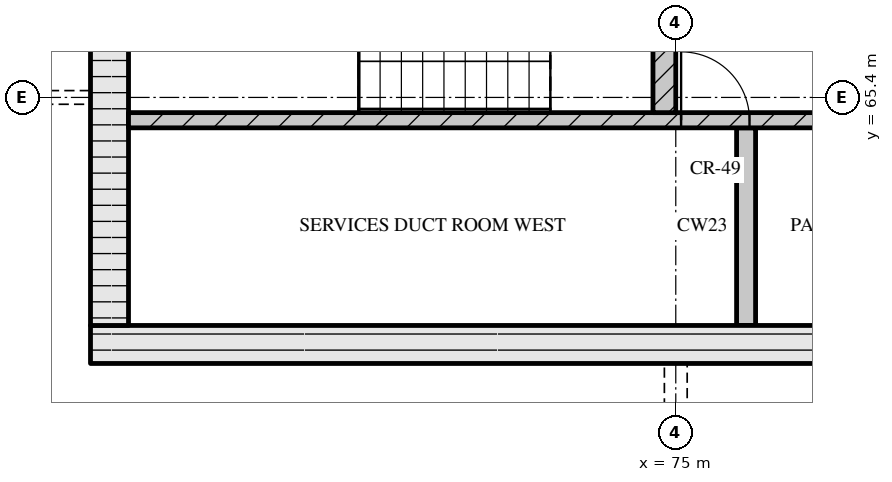
"""IFC4 building model, lengths in metres.
Left out: names, types, materials, properties, quantities, classifications, styles, units other than length and angle.
Written with IfcOpenShell. Run it as: python <this file> out.ifc"""

import sys

from ifc_helpers import new_model, si_unit, direction, frame, frame_2d, origin, place, context, subcontext, project, spatial, rectangle, extrude, element, fill, save


model = new_model("IFC4")
c1 = context("Model", 3, precision=1e-05, world=origin(), true_north=direction((0.0, 1.0)))
c2 = subcontext(c1, "Body", "Model", "MODEL_VIEW")
j1 = project(units=[si_unit("LENGTHUNIT", "METRE"), si_unit("PLANEANGLEUNIT", "RADIAN")], contexts=[c1])
p1 = place(None, origin())
s1 = spatial("IfcSite", under=j1, at=p1, CompositionType="ELEMENT")
p2 = place(p1, origin())
s2 = spatial("IfcBuilding", under=s1, at=p2, CompositionType="ELEMENT")
p3 = place(p2, frame((0.0, 0.0, 281.55)))
s3 = spatial("IfcBuildingStorey", under=s2, at=p3, CompositionType="ELEMENT", Elevation=281.55)
p4 = place(p3, frame((67.3, 62.15, 0.0), z_axis=(0.0, 0.0, 1.0), x_axis=(1.0, 0.0, 0.0)))
e1 = element("IfcWall", 1, at=p4, inside=s3, PredefinedType="SOLIDWALL", context=c2, shape_type="SweptSolid", body=[
    extrude(rectangle(XDim=40.6, YDim=0.5, at=frame_2d((20.3, 0.0))), origin(), (0.0, 0.0, 1.0), 3.32),
])
p5 = place(p4, frame((20.65, 0.0, 0.0)))
e2 = element("IfcOpeningElement", 2, at=p5, cuts=e1, PredefinedType="OPENING", context=c2, shape_type="SweptSolid", body=[
    extrude(rectangle(XDim=1.8, YDim=2.1, at=frame_2d((0.9, 1.05))), frame((0.0, 0.26, 0.0), z_axis=(0.0, -1.0, 0.0), x_axis=(1.0, 0.0, 0.0)), (0.0, 0.0, 1.0), 0.52),
])
p6 = place(p3, frame((67.55, 62.4, 0.0), z_axis=(0.0, 0.0, 1.0), x_axis=(0.0, 1.0, 0.0)))
e3 = element("IfcWall", 3, at=p6, inside=s3, PredefinedType="SOLIDWALL", context=c2, shape_type="SweptSolid", body=[
    extrude(rectangle(XDim=12.0, YDim=0.5, at=frame_2d((6.0, 0.0))), origin(), (0.0, 0.0, 1.0), 3.32),
])
p7 = place(p6, frame((6.45, 0.0, 0.0)))
e4 = element("IfcOpeningElement", 4, at=p7, cuts=e3, PredefinedType="OPENING", context=c2, shape_type="SweptSolid", body=[
    extrude(rectangle(XDim=1.2, YDim=2.1, at=frame_2d((0.6, 1.05))), frame((0.0, 0.26, 0.0), z_axis=(0.0, -1.0, 0.0), x_axis=(1.0, 0.0, 0.0)), (0.0, 0.0, 1.0), 0.52),
])
p8 = place(p3, frame((75.925, 62.4, 0.0), z_axis=(0.0, 0.0, 1.0), x_axis=(0.0, 1.0, 0.0)))
e5 = element("IfcWall", 5, at=p8, inside=s3, PredefinedType="SOLIDWALL", context=c2, shape_type="SweptSolid", body=[
    extrude(rectangle(XDim=2.6, YDim=0.25, at=frame_2d((1.3, 0.0))), origin(), (0.0, 0.0, 1.0), 3.32),
])
p9 = place(p3, frame((67.8, 65.1, 0.0), z_axis=(0.0, 0.0, 1.0), x_axis=(1.0, 0.0, 0.0)))
e6 = element("IfcWall", 6, at=p9, inside=s3, PredefinedType="SOLIDWALL", context=c2, shape_type="SweptSolid", body=[
    extrude(rectangle(XDim=18.5, YDim=0.2, at=frame_2d((9.25, 0.0))), origin(), (0.0, 0.0, 1.0), 3.32),
])
p10 = place(p9, frame((7.27, 0.0, 0.0)))
e7 = element("IfcOpeningElement", 7, at=p10, cuts=e6, PredefinedType="OPENING", context=c2, shape_type="SweptSolid", body=[
    extrude(rectangle(XDim=0.9, YDim=2.1, at=frame_2d((0.45, 1.05))), frame((0.0, 0.11, 0.0), z_axis=(0.0, -1.0, 0.0), x_axis=(1.0, 0.0, 0.0)), (0.0, 0.0, 1.0), 0.22),
])
p11 = place(p9, frame((9.05, 0.0, 0.0)))
e8 = element("IfcOpeningElement", 8, at=p11, cuts=e6, PredefinedType="OPENING", context=c2, shape_type="SweptSolid", body=[
    extrude(rectangle(XDim=0.9, YDim=2.1, at=frame_2d((0.45, 1.05))), frame((0.0, 0.11, 0.0), z_axis=(0.0, -1.0, 0.0), x_axis=(1.0, 0.0, 0.0)), (0.0, 0.0, 1.0), 0.22),
])
p12 = place(p9, frame((12.76, 0.0, 0.0)))
e9 = element("IfcOpeningElement", 9, at=p12, cuts=e6, PredefinedType="OPENING", context=c2, shape_type="SweptSolid", body=[
    extrude(rectangle(XDim=0.9, YDim=2.1, at=frame_2d((0.45, 1.05))), frame((0.0, 0.11, 0.0), z_axis=(0.0, -1.0, 0.0), x_axis=(1.0, 0.0, 0.0)), (0.0, 0.0, 1.0), 0.22),
])
p13 = place(p9, frame((16.7, 0.0, 0.0)))
e10 = element("IfcOpeningElement", 10, at=p13, cuts=e6, PredefinedType="OPENING", context=c2, shape_type="SweptSolid", body=[
    extrude(rectangle(XDim=0.9, YDim=2.1, at=frame_2d((0.45, 1.05))), frame((0.0, 0.11, 0.0), z_axis=(0.0, -1.0, 0.0), x_axis=(1.0, 0.0, 0.0)), (0.0, 0.0, 1.0), 0.22),
])
p14 = place(p3, frame((74.85, 65.2, 0.0), z_axis=(0.0, 0.0, 1.0), x_axis=(0.0, 1.0, 0.0)))
e11 = element("IfcWall", 11, at=p14, inside=s3, PredefinedType="SOLIDWALL", context=c2, shape_type="SweptSolid", body=[
    extrude(rectangle(XDim=2.85, YDim=0.3, at=frame_2d((1.425, 0.0))), origin(), (0.0, 0.0, 1.0), 3.32),
])
p15 = place(p10, origin())
e12 = element("IfcDoor", 12, at=p15, inside=s3, OperationType="SINGLE_SWING_LEFT", PredefinedType="DOOR", context=c2, shape_type="SweptSolid", body=[
    extrude(rectangle(XDim=0.9, YDim=2.1, at=frame_2d((0.45, 1.05))), frame((0.0, 0.025, 0.0), z_axis=(0.0, -1.0, 0.0), x_axis=(1.0, 0.0, 0.0)), (0.0, 0.0, 1.0), 0.05),
])
fill(e7, e12)
save(model, sys.argv[1])
